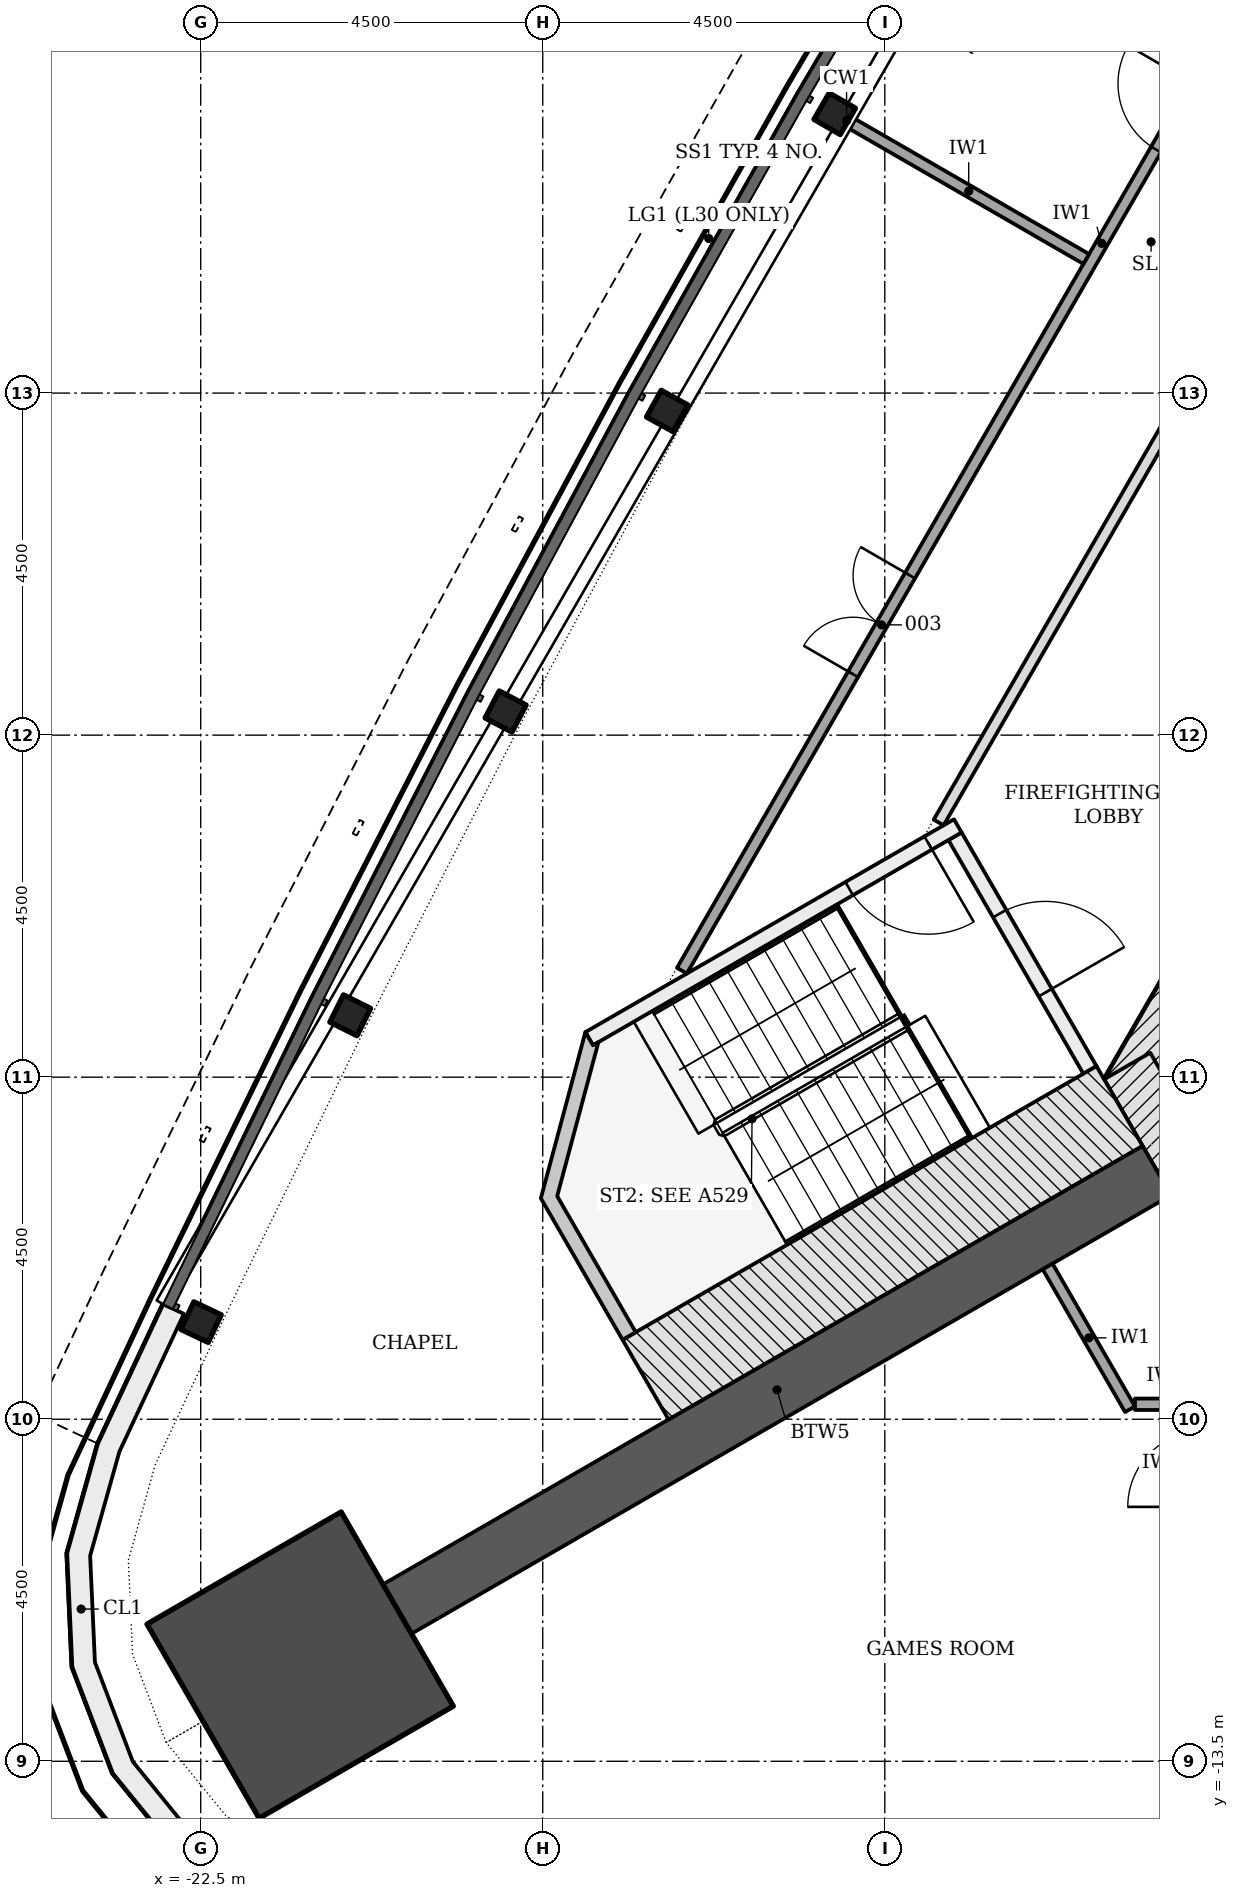
"""IFC4 building model, lengths in metres.
Left out: names, types, materials, properties, quantities, classifications, styles, units other than length and angle.
Written with IfcOpenShell. Run it as: python <this file> out.ifc"""

import sys

from ifc_helpers import new_model, si_unit, direction, frame, frame_2d, origin, origin_2d, place, context, subcontext, project, spatial, polyline, rectangle, i_section, outline, extrude, element, fill, save


model = new_model("IFC4")
c1 = context("Model", 3, precision=1e-05, world=origin(), true_north=direction((0.0, 1.0)))
c2 = subcontext(c1, "Body", "Model", "MODEL_VIEW")
j1 = project(units=[si_unit("LENGTHUNIT", "METRE"), si_unit("PLANEANGLEUNIT", "RADIAN")], contexts=[c1])
p1 = place(None, origin())
s1 = spatial("IfcSite", under=j1, at=p1, CompositionType="ELEMENT")
p2 = place(p1, origin())
s2 = spatial("IfcBuilding", under=s1, at=p2, CompositionType="ELEMENT")
p3 = place(p2, frame((0.0, 0.0, 116.7)))
s3 = spatial("IfcBuildingStorey", under=s2, at=p3, CompositionType="ELEMENT", Elevation=116.7)
p4 = place(p3, frame((-1.083, 11.281, -0.2), z_axis=(0.0, 0.0, 1.0), x_axis=(-0.500001446645, -0.866024568562, 0.0)))
e1 = element("IfcWall", 1, at=p4, inside=s3, PredefinedType="SHEAR", context=c2, shape_type="SweptSolid", body=[
    extrude(rectangle(XDim=18.458, YDim=0.7, at=frame_2d((9.229, 0.0))), origin(), (0.0, 0.0, 1.0), 3.6),
])
p5 = place(p4, frame((8.979, 0.0, 0.2)))
e2 = element("IfcOpeningElement", 2, at=p5, cuts=e1, PredefinedType="OPENING", context=c2, shape_type="SweptSolid", body=[
    extrude(rectangle(XDim=1.2, YDim=2.1, at=frame_2d((0.6, 1.05))), frame((0.0, 0.36, 0.0), z_axis=(0.0, -1.0, 0.0), x_axis=(1.0, 0.0, 0.0)), (0.0, 0.0, 1.0), 0.72),
])
p6 = place(p4, frame((11.029, 0.0, 0.2)))
e3 = element("IfcOpeningElement", 3, at=p6, cuts=e1, PredefinedType="OPENING", context=c2, shape_type="SweptSolid", body=[
    extrude(rectangle(XDim=1.2, YDim=2.1, at=frame_2d((0.6, 1.05))), frame((0.0, 0.36, 0.0), z_axis=(0.0, -1.0, 0.0), x_axis=(1.0, 0.0, 0.0)), (0.0, 0.0, 1.0), 0.72),
])
p7 = place(p3, frame((-10.311, -4.353, -0.2), z_axis=(0.0, 0.0, 1.0), x_axis=(0.500042739161, -0.866000726912, 0.0)))
e4 = element("IfcWall", 4, at=p7, inside=s3, PredefinedType="SHEAR", context=c2, shape_type="SweptSolid", body=[
    extrude(rectangle(XDim=2.771, YDim=0.7, at=frame_2d((1.386, 0.0))), origin(), (0.0, 0.0, 1.0), 3.6),
])
p8 = place(p3, frame((-9.922, -5.728, -0.2), z_axis=(0.0, 0.0, 1.0), x_axis=(-0.866024913782, -0.500000848707, 0.0)))
e5 = element("IfcWall", 5, at=p8, inside=s3, PredefinedType="SHEAR", context=c2, shape_type="SweptSolid", body=[
    extrude(rectangle(XDim=11.539, YDim=0.75, at=frame_2d((5.769, 0.0))), origin(), (0.0, 0.0, 1.0), 3.6),
])
p9 = place(p3, frame((-21.192, -12.235, -0.2), z_axis=(0.0, 0.0, 1.0), x_axis=(-0.866025403784, -0.5, 0.0)))
e6 = element("IfcColumn", 6, at=p9, inside=s3, PredefinedType="COLUMN", context=c2, shape_type="SweptSolid", body=[
    extrude(rectangle(XDim=2.95, YDim=2.95, at=origin_2d()), origin(), (0.0, 0.0, 1.0), 3.6),
])
for number, where, z_axis, x_axis in (
    (7, (-14.159, 8.175, -0.2), (0.0, 0.0, 1.0), (-0.5, -0.866, 0.0)),
    (8, (-16.364, 4.265, -0.2), (0.0, 0.0, 1.0), (-0.482, -0.876, 0.0)),
    (9, (-18.489, 0.311, -0.2), (0.0, 0.0, 1.0), (-0.464, -0.886, 0.0)),
    (10, (-20.533, -3.686, -0.2), (0.0, 0.0, 1.0), (-0.446, -0.895, 0.0)),
    (11, (-22.496, -7.722, -0.2), (0.0, 0.0, 1.0), (-0.428, -0.904, 0.0)),
):
    element("IfcColumn", number, at=place(p3, frame(where, z_axis=z_axis, x_axis=x_axis)), inside=s3, PredefinedType="COLUMN", context=c2, shape_type="SweptSolid", body=[
        extrude(i_section(OverallWidth=0.401, OverallDepth=0.399, WebThickness=0.025, FlangeThickness=0.04, FilletRadius=0.015, at=origin_2d()), origin(), (0.0, 0.0, 1.0), 3.6),
    ])
p10 = place(p3, origin())
e12 = element("IfcWall", 12, at=p10, inside=s3, PredefinedType="NOTDEFINED", context=c2, shape_type="SweptSolid", body=[
    extrude(outline(polyline([(-22.993, -7.487), (-23.852, -9.322), (-24.257, -10.763), (-24.189, -12.259), (-23.656, -13.658), (-22.711, -14.819), (-21.449, -15.625), (-19.999, -15.995), (-17.98, -16.169), (-17.955, -15.87), (-19.948, -15.699), (-21.328, -15.347), (-22.509, -14.592), (-23.393, -13.506), (-23.891, -12.197), (-23.955, -10.798), (-23.57, -9.426), (-22.721, -7.614), (-22.993, -7.487)])), origin(), (0.0, 0.0, 1.0), 3.3),
])
p11 = place(p3, frame((-12.576, -1.331, -0.2), z_axis=(0.0, 0.0, 1.0), x_axis=(0.499970499736, -0.8660424351, 0.0)))
e13 = element("IfcWall", 13, at=p11, inside=s3, PredefinedType="SHEAR", context=c2, shape_type="SweptSolid", body=[
    extrude(rectangle(XDim=3.55, YDim=0.2, at=frame_2d((1.775, 0.0))), origin(), (0.0, 0.0, 1.0), 3.6),
])
p12 = place(p11, frame((1.175, 0.0, 0.2)))
e14 = element("IfcOpeningElement", 14, at=p12, cuts=e13, PredefinedType="OPENING", context=c2, shape_type="SweptSolid", body=[
    extrude(rectangle(XDim=1.2, YDim=2.1, at=frame_2d((0.6, 1.05))), frame((0.0, 0.11, 0.0), z_axis=(0.0, -1.0, 0.0), x_axis=(1.0, 0.0, 0.0)), (0.0, 0.0, 1.0), 0.22),
])
p13 = place(p3, frame((-12.539, -1.194, -0.2), z_axis=(0.0, 0.0, 1.0), x_axis=(-0.866045472092, -0.499965239061, 0.0)))
e15 = element("IfcWall", 15, at=p13, inside=s3, PredefinedType="SHEAR", context=c2, shape_type="SweptSolid", body=[
    extrude(rectangle(XDim=5.6, YDim=0.2, at=frame_2d((2.8, 0.0))), origin(), (0.0, 0.0, 1.0), 3.6),
])
p14 = place(p13, frame((0.45, 0.0, 0.2)))
e16 = element("IfcOpeningElement", 16, at=p14, cuts=e15, PredefinedType="OPENING", context=c2, shape_type="SweptSolid", body=[
    extrude(rectangle(XDim=1.2, YDim=2.1, at=frame_2d((0.6, 1.05))), frame((0.0, 0.11, 0.0), z_axis=(0.0, -1.0, 0.0), x_axis=(1.0, 0.0, 0.0)), (0.0, 0.0, 1.0), 0.22),
])
p15 = place(p3, frame((-10.412, -4.879, -0.2), z_axis=(0.0, 0.0, 1.0), x_axis=(-0.866026919366, -0.499997374926, 0.0)))
e17 = element("IfcWall", 17, at=p15, inside=s3, PredefinedType="SHEAR", context=c2, shape_type="SweptSolid", body=[
    extrude(rectangle(XDim=7.2, YDim=1.211, at=frame_2d((3.6, 0.0))), origin(), (0.0, 0.0, 1.0), 3.6),
])
p16 = place(p3, frame((0.0, 0.0, -0.2)))
e18 = element("IfcWall", 18, at=p16, inside=s3, PredefinedType="SHEAR", context=c2, shape_type="SweptSolid", body=[
    extrude(outline(polyline([(-17.439, -3.907), (-18.025, -6.093), (-16.95, -7.955), (-16.777, -7.855), (-17.81, -6.065), (-17.267, -4.039), (-17.339, -4.081), (-17.339, -4.081), (-17.339, -4.081), (-17.339, -4.081), (-17.339, -4.081), (-17.339, -4.081), (-17.339, -4.081), (-17.339, -4.081), (-17.339, -4.081), (-17.339, -4.081), (-17.339, -4.081), (-17.339, -4.081), (-17.339, -4.081), (-17.339, -4.081), (-17.339, -4.081), (-17.339, -4.081), (-17.339, -4.081), (-17.439, -3.907)])), origin(), (0.0, 0.0, 1.0), 3.6),
])
p17 = place(p3, frame((-16.169, -3.099, 0.0), z_axis=(0.0, 0.0, 1.0), x_axis=(0.499999805269, 0.866025516212, 0.0)))
e19 = element("IfcWall", 19, at=p17, inside=s3, PredefinedType="PARTITIONING", context=c2, shape_type="SweptSolid", body=[
    extrude(rectangle(XDim=22.097, YDim=0.15, at=frame_2d((11.049, 0.0))), origin(), (0.0, 0.0, 1.0), 2.847),
])
p18 = place(p17, frame((17.842, 0.0, 0.0)))
e20 = element("IfcOpeningElement", 20, at=p18, cuts=e19, PredefinedType="OPENING", context=c2, shape_type="SweptSolid", body=[
    extrude(rectangle(XDim=1.5, YDim=2.1, at=frame_2d((0.75, 1.05))), frame((0.0, 0.085, 0.0), z_axis=(0.0, -1.0, 0.0), x_axis=(1.0, 0.0, 0.0)), (0.0, 0.0, 1.0), 0.17),
])
p19 = place(p17, frame((12.474, 0.0, 0.0)))
e21 = element("IfcOpeningElement", 21, at=p19, cuts=e19, PredefinedType="OPENING", context=c2, shape_type="SweptSolid", body=[
    extrude(rectangle(XDim=1.0, YDim=2.1, at=frame_2d((0.5, 1.05))), frame((0.0, 0.085, 0.0), z_axis=(0.0, -1.0, 0.0), x_axis=(1.0, 0.0, 0.0)), (0.0, 0.0, 1.0), 0.17),
])
p20 = place(p17, frame((4.503, 0.0, 0.0)))
e22 = element("IfcOpeningElement", 22, at=p20, cuts=e19, PredefinedType="OPENING", context=c2, shape_type="SweptSolid", body=[
    extrude(rectangle(XDim=1.5, YDim=2.1, at=frame_2d((0.75, 1.05))), frame((0.0, 0.085, 0.0), z_axis=(0.0, -1.0, 0.0), x_axis=(1.0, 0.0, 0.0)), (0.0, 0.0, 1.0), 0.17),
])
p21 = place(p3, frame((-4.407, 13.374, 0.0), z_axis=(0.0, 0.0, 1.0), x_axis=(-0.499997181693, -0.866027030928, 0.0)))
e23 = element("IfcWall", 23, at=p21, inside=s3, PredefinedType="PARTITIONING", context=c2, shape_type="SweptSolid", body=[
    extrude(rectangle(XDim=16.77, YDim=0.15, at=frame_2d((8.385, 0.0))), origin(), (0.0, 0.0, 1.0), 2.847),
])
p22 = place(p21, frame((8.879, 0.0, 0.0)))
e24 = element("IfcOpeningElement", 24, at=p22, cuts=e23, PredefinedType="OPENING", context=c2, shape_type="SweptSolid", body=[
    extrude(rectangle(XDim=1.0, YDim=2.1, at=frame_2d((0.5, 1.05))), frame((0.0, 0.085, 0.0), z_axis=(0.0, -1.0, 0.0), x_axis=(1.0, 0.0, 0.0)), (0.0, 0.0, 1.0), 0.17),
])
p23 = place(p3, frame((-11.358, -6.99, 0.0), z_axis=(0.0, 0.0, 1.0), x_axis=(0.500050590816, -0.865996193193, 0.0)))
e25 = element("IfcWall", 25, at=p23, inside=s3, PredefinedType="PARTITIONING", context=c2, shape_type="SweptSolid", body=[
    extrude(rectangle(XDim=2.168, YDim=0.15, at=frame_2d((1.084, 0.0))), origin(), (0.0, 0.0, 1.0), 3.4),
])
p24 = place(p3, frame((-10.209, -8.803, 0.0), z_axis=(0.0, 0.0, 1.0), x_axis=(1.0, 0.0, 0.0)))
e26 = element("IfcWall", 26, at=p24, inside=s3, PredefinedType="PARTITIONING", context=c2, shape_type="SweptSolid", body=[
    extrude(rectangle(XDim=0.83, YDim=0.15, at=frame_2d((0.415, 0.0))), origin(), (0.0, 0.0, 1.0), 3.4),
])
p25 = place(p3, frame((-13.942, 8.05, 0.0), z_axis=(0.0, 0.0, 1.0), x_axis=(0.866034162518, -0.499984829122, 0.0)))
e27 = element("IfcWall", 27, at=p25, inside=s3, PredefinedType="PARTITIONING", context=c2, shape_type="SweptSolid", body=[
    extrude(rectangle(XDim=3.571, YDim=0.15, at=frame_2d((1.785, 0.0))), origin(), (0.0, 0.0, 1.0), 2.847),
])
p26 = place(p12, origin())
e28 = element("IfcDoor", 28, at=p26, inside=s3, OperationType="SINGLE_SWING_RIGHT", PredefinedType="DOOR", context=c2, shape_type="SweptSolid", body=[
    extrude(rectangle(XDim=1.2, YDim=2.1, at=frame_2d((0.6, 1.05))), frame((0.0, 0.025, 0.0), z_axis=(0.0, -1.0, 0.0), x_axis=(1.0, 0.0, 0.0)), (0.0, 0.0, 1.0), 0.05),
])
fill(e14, e28)
p27 = place(p14, origin())
e29 = element("IfcDoor", 29, at=p27, inside=s3, OperationType="SINGLE_SWING_LEFT", PredefinedType="DOOR", context=c2, shape_type="SweptSolid", body=[
    extrude(rectangle(XDim=1.2, YDim=2.1, at=frame_2d((0.6, 1.05))), frame((0.0, 0.025, 0.0), z_axis=(0.0, -1.0, 0.0), x_axis=(1.0, 0.0, 0.0)), (0.0, 0.0, 1.0), 0.05),
])
fill(e16, e29)
p28 = place(p19, origin())
e30 = element("IfcDoor", 30, at=p28, inside=s3, OperationType="SINGLE_SWING_RIGHT", PredefinedType="DOOR", context=c2, shape_type="SweptSolid", body=[
    extrude(rectangle(XDim=1.0, YDim=2.1, at=frame_2d((0.5, 1.05))), frame((0.0, 0.025, 0.0), z_axis=(0.0, -1.0, 0.0), x_axis=(1.0, 0.0, 0.0)), (0.0, 0.0, 1.0), 0.05),
])
fill(e21, e30)
p29 = place(p20, origin())
e31 = element("IfcDoor", 31, at=p29, inside=s3, OperationType="DOUBLE_DOOR_SINGLE_SWING", PredefinedType="DOOR", context=c2, shape_type="SweptSolid", body=[
    extrude(rectangle(XDim=1.5, YDim=2.1, at=frame_2d((0.75, 1.05))), frame((0.0, 0.025, 0.0), z_axis=(0.0, -1.0, 0.0), x_axis=(1.0, 0.0, 0.0)), (0.0, 0.0, 1.0), 0.05),
])
fill(e22, e31)
save(model, sys.argv[1])
